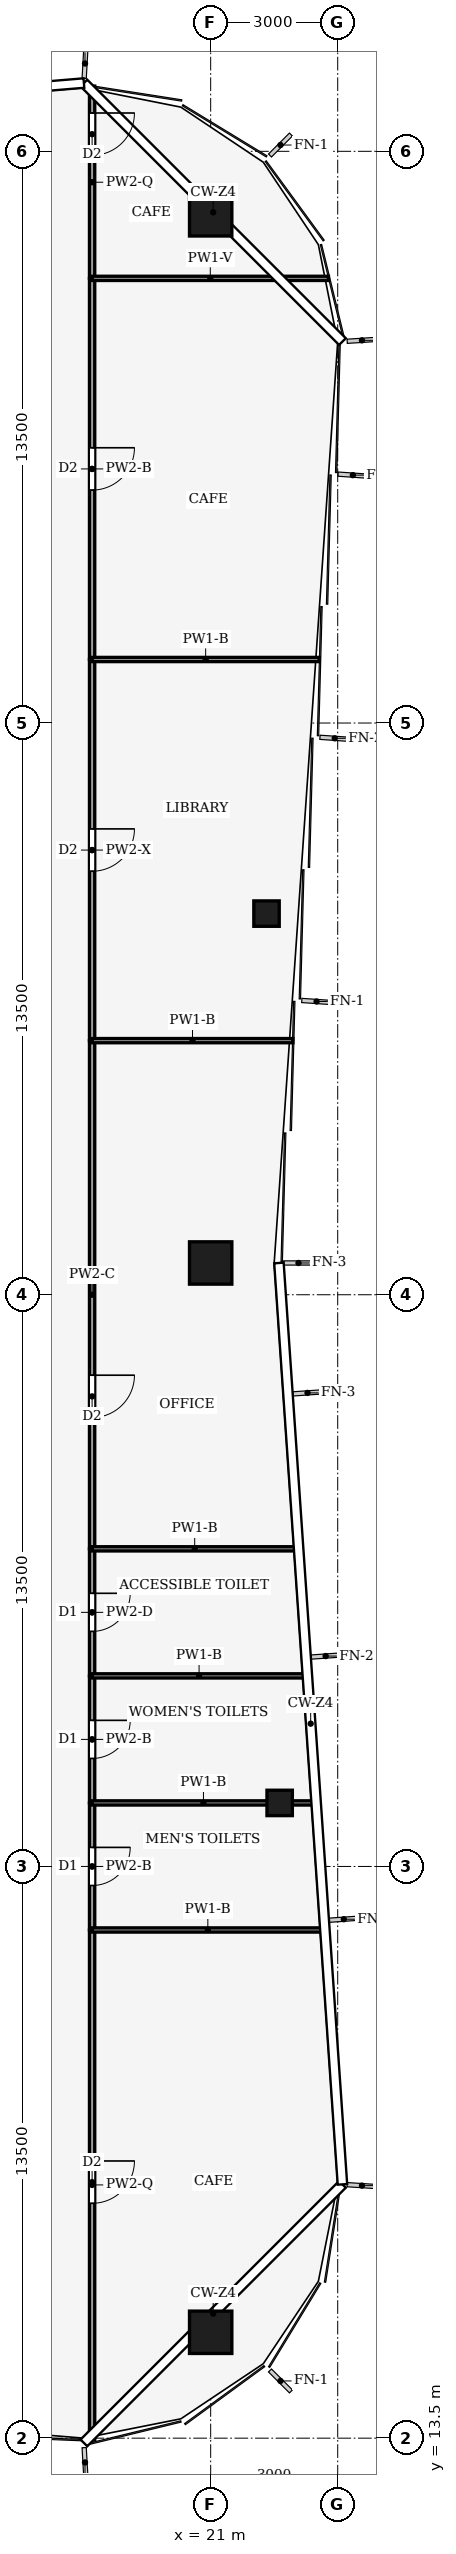
"""IFC4 building model, lengths in metres.
Left out: names, types, materials, properties, quantities, classifications, styles, units other than length and angle.
Written with IfcOpenShell. Run it as: python <this file> out.ifc"""

import sys

from ifc_helpers import new_model, si_unit, direction, frame, frame_2d, origin, origin_2d, place, context, subcontext, project, spatial, rectangle, hollow_rectangle, extrude, element, fill, save


model = new_model("IFC4")
c1 = context("Model", 3, precision=1e-05, world=origin(), true_north=direction((0.0, 1.0)))
c2 = subcontext(c1, "Body", "Model", "MODEL_VIEW")
j1 = project(units=[si_unit("LENGTHUNIT", "METRE"), si_unit("PLANEANGLEUNIT", "RADIAN")], contexts=[c1])
p1 = place(None, origin())
s1 = spatial("IfcSite", under=j1, at=p1, CompositionType="ELEMENT")
p2 = place(p1, origin())
s2 = spatial("IfcBuilding", under=s1, at=p2, CompositionType="ELEMENT")
p3 = place(p2, frame((0.0, 0.0, 233.0)))
s3 = spatial("IfcBuildingStorey", under=s2, at=p3, CompositionType="ELEMENT", Elevation=233.0)
for number, where, z_axis, x_axis in (
    (1, (21.0, 66.0, 0.0), (0.0, 0.0, 1.0), (1.0, 0.0, 0.0)),
    (2, (21.0, 41.25, 0.0), (0.0, 0.0, 1.0), (1.0, 0.0, 0.0)),
    (3, (21.0, 16.0, 0.0), (0.0, 0.0, 1.0), (1.0, 0.0, 0.0)),
):
    element("IfcColumn", number, at=place(p3, frame(where, z_axis=z_axis, x_axis=x_axis)), inside=s3, PredefinedType="COLUMN", context=c2, shape_type="SweptSolid", body=[
        extrude(hollow_rectangle(XDim=1.0, YDim=1.0, WallThickness=0.045, at=origin_2d()), origin(), (0.0, 0.0, 1.0), 5.0),
    ])
for number, where, z_axis, x_axis in (
    (4, (22.629, 28.5, 0.0), (0.0, 0.0, 1.0), (1.0, 0.0, 0.0)),
    (5, (22.319, 49.5, 0.0), (0.0, 0.0, 1.0), (1.0, 0.0, 0.0)),
):
    element("IfcColumn", number, at=place(p3, frame(where, z_axis=z_axis, x_axis=x_axis)), inside=s3, PredefinedType="COLUMN", context=c2, shape_type="SweptSolid", body=[
        extrude(hollow_rectangle(XDim=0.6, YDim=0.6, WallThickness=0.025, at=origin_2d()), origin(), (0.0, 0.0, 1.0), 5.0),
    ])
p4 = place(p3, frame((18.2, 25.5, 0.0), z_axis=(0.0, 0.0, 1.0), x_axis=(0.0, -1.0, 0.0)))
e6 = element("IfcWall", 6, at=p4, inside=s3, PredefinedType="PARTITIONING", context=c2, shape_type="SweptSolid", body=[
    extrude(rectangle(XDim=12.04, YDim=0.125, at=frame_2d((6.02, 0.0))), origin(), (0.0, 0.0, 1.0), 3.93),
])
p5 = place(p4, frame((5.455, 0.0, 0.0)))
e7 = element("IfcOpeningElement", 7, at=p5, cuts=e6, PredefinedType="OPENING", context=c2, shape_type="SweptSolid", body=[
    extrude(rectangle(XDim=1.0, YDim=2.1, at=frame_2d((0.5, 1.05))), frame((0.0, 0.073, 0.0), z_axis=(0.0, -1.0, 0.0), x_axis=(1.0, 0.0, 0.0)), (0.0, 0.0, 1.0), 0.145),
])
p6 = place(p3, frame((18.2, 28.5, 0.0), z_axis=(0.0, 0.0, 1.0), x_axis=(0.0, -1.0, 0.0)))
e8 = element("IfcWall", 8, at=p6, inside=s3, PredefinedType="PARTITIONING", context=c2, shape_type="SweptSolid", body=[
    extrude(rectangle(XDim=3.0, YDim=0.125, at=frame_2d((1.5, 0.0))), origin(), (0.0, 0.0, 1.0), 4.87),
])
p7 = place(p6, frame((1.05, 0.0, 0.0)))
e9 = element("IfcOpeningElement", 9, at=p7, cuts=e8, PredefinedType="OPENING", context=c2, shape_type="SweptSolid", body=[
    extrude(rectangle(XDim=0.9, YDim=2.1, at=frame_2d((0.45, 1.05))), frame((0.0, 0.073, 0.0), z_axis=(0.0, -1.0, 0.0), x_axis=(1.0, 0.0, 0.0)), (0.0, 0.0, 1.0), 0.145),
])
p8 = place(p3, frame((18.2, 31.5, 0.0), z_axis=(0.0, 0.0, 1.0), x_axis=(0.0, -1.0, 0.0)))
e10 = element("IfcWall", 10, at=p8, inside=s3, PredefinedType="PARTITIONING", context=c2, shape_type="SweptSolid", body=[
    extrude(rectangle(XDim=3.0, YDim=0.125, at=frame_2d((1.5, 0.0))), origin(), (0.0, 0.0, 1.0), 4.87),
])
p9 = place(p8, frame((1.05, 0.0, 0.0)))
e11 = element("IfcOpeningElement", 11, at=p9, cuts=e10, PredefinedType="OPENING", context=c2, shape_type="SweptSolid", body=[
    extrude(rectangle(XDim=0.9, YDim=2.1, at=frame_2d((0.45, 1.05))), frame((0.0, 0.073, 0.0), z_axis=(0.0, -1.0, 0.0), x_axis=(1.0, 0.0, 0.0)), (0.0, 0.0, 1.0), 0.145),
])
p10 = place(p3, frame((18.2, 34.5, 0.0), z_axis=(0.0, 0.0, 1.0), x_axis=(0.0, -1.0, 0.0)))
e12 = element("IfcWall", 12, at=p10, inside=s3, PredefinedType="PARTITIONING", context=c2, shape_type="SweptSolid", body=[
    extrude(rectangle(XDim=3.0, YDim=0.125, at=frame_2d((1.5, 0.0))), origin(), (0.0, 0.0, 1.0), 4.48),
])
p11 = place(p10, frame((1.05, 0.0, 0.0)))
e13 = element("IfcOpeningElement", 13, at=p11, cuts=e12, PredefinedType="OPENING", context=c2, shape_type="SweptSolid", body=[
    extrude(rectangle(XDim=0.9, YDim=2.1, at=frame_2d((0.45, 1.05))), frame((0.0, 0.073, 0.0), z_axis=(0.0, -1.0, 0.0), x_axis=(1.0, 0.0, 0.0)), (0.0, 0.0, 1.0), 0.145),
])
p12 = place(p3, frame((18.2, 46.5, 0.0), z_axis=(0.0, 0.0, 1.0), x_axis=(0.0, -1.0, 0.0)))
e14 = element("IfcWall", 14, at=p12, inside=s3, PredefinedType="PARTITIONING", context=c2, shape_type="SweptSolid", body=[
    extrude(rectangle(XDim=12.0, YDim=0.125, at=frame_2d((6.0, 0.0))), origin(), (0.0, 0.0, 1.0), 4.14),
])
p13 = place(p12, frame((7.9, 0.0, 0.0)))
e15 = element("IfcOpeningElement", 15, at=p13, cuts=e14, PredefinedType="OPENING", context=c2, shape_type="SweptSolid", body=[
    extrude(rectangle(XDim=1.0, YDim=2.1, at=frame_2d((0.5, 1.05))), frame((0.0, 0.073, 0.0), z_axis=(0.0, -1.0, 0.0), x_axis=(1.0, 0.0, 0.0)), (0.0, 0.0, 1.0), 0.145),
])
p14 = place(p3, frame((18.2, 55.5, 0.0), z_axis=(0.0, 0.0, 1.0), x_axis=(0.0, -1.0, 0.0)))
e16 = element("IfcWall", 16, at=p14, inside=s3, PredefinedType="PARTITIONING", context=c2, shape_type="SweptSolid", body=[
    extrude(rectangle(XDim=9.0, YDim=0.125, at=frame_2d((4.5, 0.0))), origin(), (0.0, 0.0, 1.0), 4.24),
])
p15 = place(p14, frame((4.0, 0.0, 0.0)))
e17 = element("IfcOpeningElement", 17, at=p15, cuts=e16, PredefinedType="OPENING", context=c2, shape_type="SweptSolid", body=[
    extrude(rectangle(XDim=1.0, YDim=2.1, at=frame_2d((0.5, 1.05))), frame((0.0, 0.073, 0.0), z_axis=(0.0, -1.0, 0.0), x_axis=(1.0, 0.0, 0.0)), (0.0, 0.0, 1.0), 0.145),
])
p16 = place(p3, frame((18.2, 64.5, 0.0), z_axis=(0.0, 0.0, 1.0), x_axis=(0.0, -1.0, 0.0)))
e18 = element("IfcWall", 18, at=p16, inside=s3, PredefinedType="PARTITIONING", context=c2, shape_type="SweptSolid", body=[
    extrude(rectangle(XDim=9.0, YDim=0.125, at=frame_2d((4.5, 0.0))), origin(), (0.0, 0.0, 1.0), 4.87),
])
p17 = place(p16, frame((4.0, 0.0, 0.0)))
e19 = element("IfcOpeningElement", 19, at=p17, cuts=e18, PredefinedType="OPENING", context=c2, shape_type="SweptSolid", body=[
    extrude(rectangle(XDim=1.0, YDim=2.1, at=frame_2d((0.5, 1.05))), frame((0.0, 0.073, 0.0), z_axis=(0.0, -1.0, 0.0), x_axis=(1.0, 0.0, 0.0)), (0.0, 0.0, 1.0), 0.145),
])
p18 = place(p3, frame((18.2, 69.04, 0.0), z_axis=(0.0, 0.0, 1.0), x_axis=(0.0, -1.0, 0.0)))
e20 = element("IfcWall", 20, at=p18, inside=s3, PredefinedType="PARTITIONING", context=c2, shape_type="SweptSolid", body=[
    extrude(rectangle(XDim=4.54, YDim=0.125, at=frame_2d((2.27, 0.0))), origin(), (0.0, 0.0, 1.0), 3.93),
])
p19 = place(p18, frame((0.635, 0.0, 0.0)))
e21 = element("IfcOpeningElement", 21, at=p19, cuts=e20, PredefinedType="OPENING", context=c2, shape_type="SweptSolid", body=[
    extrude(rectangle(XDim=1.0, YDim=2.1, at=frame_2d((0.5, 1.05))), frame((0.0, 0.073, 0.0), z_axis=(0.0, -1.0, 0.0), x_axis=(1.0, 0.0, 0.0)), (0.0, 0.0, 1.0), 0.145),
])
p20 = place(p3, frame((23.666, 25.5, 0.0), z_axis=(0.0, 0.0, 1.0), x_axis=(-1.0, 0.0, 0.0)))
e22 = element("IfcWall", 22, at=p20, inside=s3, PredefinedType="PARTITIONING", context=c2, shape_type="SweptSolid", body=[
    extrude(rectangle(XDim=5.466, YDim=0.1, at=frame_2d((2.733, 0.0))), origin(), (0.0, 0.0, 1.0), 4.04),
])
p21 = place(p3, frame((23.459, 28.5, 0.0), z_axis=(0.0, 0.0, 1.0), x_axis=(-1.0, 0.0, 0.0)))
e23 = element("IfcWall", 23, at=p21, inside=s3, PredefinedType="PARTITIONING", context=c2, shape_type="SweptSolid", body=[
    extrude(rectangle(XDim=5.259, YDim=0.1, at=frame_2d((2.63, 0.0))), origin(), (0.0, 0.0, 1.0), 4.04),
])
p22 = place(p3, frame((23.252, 31.5, 0.0), z_axis=(0.0, 0.0, 1.0), x_axis=(-1.0, 0.0, 0.0)))
e24 = element("IfcWall", 24, at=p22, inside=s3, PredefinedType="PARTITIONING", context=c2, shape_type="SweptSolid", body=[
    extrude(rectangle(XDim=5.052, YDim=0.1, at=frame_2d((2.526, 0.0))), origin(), (0.0, 0.0, 1.0), 4.04),
])
p23 = place(p3, frame((23.045, 34.5, 0.0), z_axis=(0.0, 0.0, 1.0), x_axis=(-1.0, 0.0, 0.0)))
e25 = element("IfcWall", 25, at=p23, inside=s3, PredefinedType="PARTITIONING", context=c2, shape_type="SweptSolid", body=[
    extrude(rectangle(XDim=4.845, YDim=0.1, at=frame_2d((2.423, 0.0))), origin(), (0.0, 0.0, 1.0), 4.04),
])
p24 = place(p3, frame((22.942, 46.5, 0.0), z_axis=(0.0, 0.0, 1.0), x_axis=(-1.0, 0.0, 0.0)))
e26 = element("IfcWall", 26, at=p24, inside=s3, PredefinedType="PARTITIONING", context=c2, shape_type="SweptSolid", body=[
    extrude(rectangle(XDim=4.742, YDim=0.1, at=frame_2d((2.371, 0.0))), origin(), (0.0, 0.0, 1.0), 4.04),
])
p25 = place(p3, frame((23.563, 55.5, 0.0), z_axis=(0.0, 0.0, 1.0), x_axis=(-1.0, 0.0, 0.0)))
e27 = element("IfcWall", 27, at=p25, inside=s3, PredefinedType="PARTITIONING", context=c2, shape_type="SweptSolid", body=[
    extrude(rectangle(XDim=5.363, YDim=0.1, at=frame_2d((2.681, 0.0))), origin(), (0.0, 0.0, 1.0), 4.04),
])
p26 = place(p3, frame((23.781, 64.5, 0.0), z_axis=(0.0, 0.0, 1.0), x_axis=(-1.0, 0.0, 0.0)))
e28 = element("IfcWall", 28, at=p26, inside=s3, PredefinedType="PARTITIONING", context=c2, shape_type="SweptSolid", body=[
    extrude(rectangle(XDim=5.582, YDim=0.1, at=frame_2d((2.791, 0.0))), origin(), (0.0, 0.0, 1.0), 3.93),
])
p27 = place(p5, origin())
e29 = element("IfcDoor", 29, at=p27, inside=s3, OperationType="SINGLE_SWING_LEFT", PredefinedType="DOOR", context=c2, shape_type="SweptSolid", body=[
    extrude(rectangle(XDim=1.0, YDim=2.1, at=frame_2d((0.5, 1.05))), frame((0.0, 0.025, 0.0), z_axis=(0.0, -1.0, 0.0), x_axis=(1.0, 0.0, 0.0)), (0.0, 0.0, 1.0), 0.05),
])
fill(e7, e29)
p28 = place(p7, origin())
e30 = element("IfcDoor", 30, at=p28, inside=s3, OperationType="SINGLE_SWING_RIGHT", PredefinedType="DOOR", context=c2, shape_type="SweptSolid", body=[
    extrude(rectangle(XDim=0.9, YDim=2.1, at=frame_2d((0.45, 1.05))), frame((0.0, 0.025, 0.0), z_axis=(0.0, -1.0, 0.0), x_axis=(1.0, 0.0, 0.0)), (0.0, 0.0, 1.0), 0.05),
])
fill(e9, e30)
p29 = place(p9, origin())
e31 = element("IfcDoor", 31, at=p29, inside=s3, OperationType="SINGLE_SWING_LEFT", PredefinedType="DOOR", context=c2, shape_type="SweptSolid", body=[
    extrude(rectangle(XDim=0.9, YDim=2.1, at=frame_2d((0.45, 1.05))), frame((0.0, 0.025, 0.0), z_axis=(0.0, -1.0, 0.0), x_axis=(1.0, 0.0, 0.0)), (0.0, 0.0, 1.0), 0.05),
])
fill(e11, e31)
p30 = place(p11, origin())
e32 = element("IfcDoor", 32, at=p30, inside=s3, OperationType="SINGLE_SWING_RIGHT", PredefinedType="DOOR", context=c2, shape_type="SweptSolid", body=[
    extrude(rectangle(XDim=0.9, YDim=2.1, at=frame_2d((0.45, 1.05))), frame((0.0, 0.025, 0.0), z_axis=(0.0, -1.0, 0.0), x_axis=(1.0, 0.0, 0.0)), (0.0, 0.0, 1.0), 0.05),
])
fill(e13, e32)
p31 = place(p13, origin())
e33 = element("IfcDoor", 33, at=p31, inside=s3, OperationType="SINGLE_SWING_RIGHT", PredefinedType="DOOR", context=c2, shape_type="SweptSolid", body=[
    extrude(rectangle(XDim=1.0, YDim=2.1, at=frame_2d((0.5, 1.05))), frame((0.0, 0.025, 0.0), z_axis=(0.0, -1.0, 0.0), x_axis=(1.0, 0.0, 0.0)), (0.0, 0.0, 1.0), 0.05),
])
fill(e15, e33)
p32 = place(p15, origin())
e34 = element("IfcDoor", 34, at=p32, inside=s3, OperationType="SINGLE_SWING_RIGHT", PredefinedType="DOOR", context=c2, shape_type="SweptSolid", body=[
    extrude(rectangle(XDim=1.0, YDim=2.1, at=frame_2d((0.5, 1.05))), frame((0.0, 0.025, 0.0), z_axis=(0.0, -1.0, 0.0), x_axis=(1.0, 0.0, 0.0)), (0.0, 0.0, 1.0), 0.05),
])
fill(e17, e34)
p33 = place(p17, origin())
e35 = element("IfcDoor", 35, at=p33, inside=s3, OperationType="SINGLE_SWING_LEFT", PredefinedType="DOOR", context=c2, shape_type="SweptSolid", body=[
    extrude(rectangle(XDim=1.0, YDim=2.1, at=frame_2d((0.5, 1.05))), frame((0.0, 0.025, 0.0), z_axis=(0.0, -1.0, 0.0), x_axis=(1.0, 0.0, 0.0)), (0.0, 0.0, 1.0), 0.05),
])
fill(e19, e35)
p34 = place(p19, origin())
e36 = element("IfcDoor", 36, at=p34, inside=s3, OperationType="SINGLE_SWING_LEFT", PredefinedType="DOOR", context=c2, shape_type="SweptSolid", body=[
    extrude(rectangle(XDim=1.0, YDim=2.1, at=frame_2d((0.5, 1.05))), frame((0.0, 0.025, 0.0), z_axis=(0.0, -1.0, 0.0), x_axis=(1.0, 0.0, 0.0)), (0.0, 0.0, 1.0), 0.05),
])
fill(e21, e36)
save(model, sys.argv[1])
